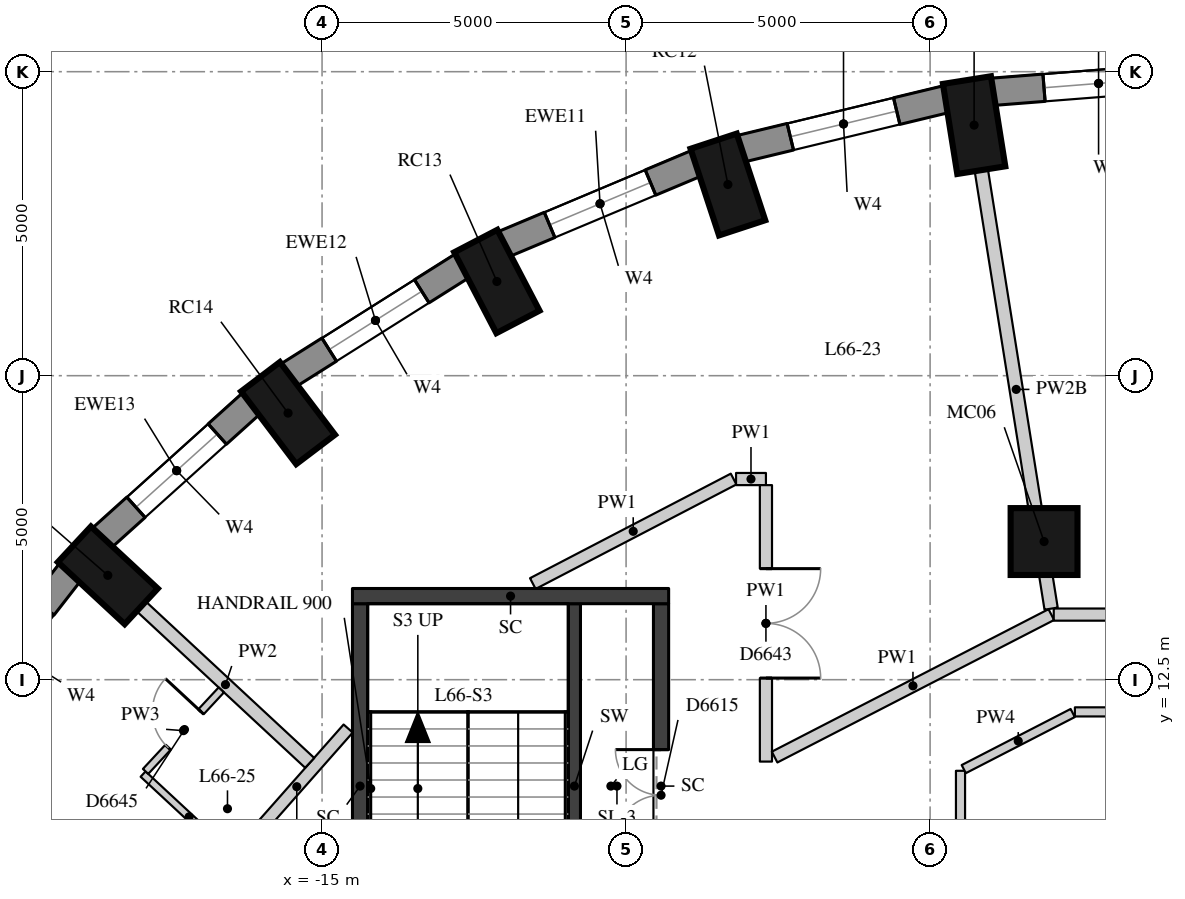
"""IFC4 building model, lengths in metres.
Left out: names, types, materials, properties, quantities, classifications, styles, units other than length and angle.
Written with IfcOpenShell. Run it as: python <this file> out.ifc"""

import sys

from ifc_helpers import new_model, si_unit, direction, frame, frame_2d, origin, origin_2d, place, context, subcontext, project, spatial, rectangle, extrude, element, fill, save


model = new_model("IFC4")
c1 = context("Model", 3, precision=1e-05, world=origin(), true_north=direction((0.0, 1.0)))
c2 = subcontext(c1, "Body", "Model", "MODEL_VIEW")
j1 = project(units=[si_unit("LENGTHUNIT", "METRE"), si_unit("PLANEANGLEUNIT", "RADIAN")], contexts=[c1])
p1 = place(None, origin())
s1 = spatial("IfcSite", under=j1, at=p1, CompositionType="ELEMENT")
p2 = place(p1, origin())
s2 = spatial("IfcBuilding", under=s1, at=p2, CompositionType="ELEMENT")
p3 = place(p2, frame((0.0, 0.0, 233.3)))
s3 = spatial("IfcBuildingStorey", under=s2, at=p3, CompositionType="ELEMENT", Elevation=233.3)
for number, where, z_axis, x_axis in (
    (1, (-4.276, 21.621, 0.0), (0.0, 0.0, 1.0), (-0.157, 0.988, 0.0)),
    (2, (-8.326, 20.644, 0.0), (0.0, 0.0, 1.0), (-0.312, 0.95, 0.0)),
    (3, (-12.125, 19.05, 0.0), (0.0, 0.0, 1.0), (-0.462, 0.887, 0.0)),
    (4, (-15.559, 16.885, 0.0), (0.0, 0.0, 1.0), (-0.604, 0.797, 0.0)),
    (5, (-18.523, 14.216, 0.0), (0.0, 0.0, 1.0), (-0.733, 0.681, 0.0)),
):
    element("IfcColumn", number, at=place(p3, frame(where, z_axis=z_axis, x_axis=x_axis)), inside=s3, PredefinedType="COLUMN", context=c2, shape_type="SweptSolid", body=[
        extrude(rectangle(XDim=1.5, YDim=0.8, at=origin_2d()), origin(), (0.0, 0.0, 1.0), 3.3),
    ])
p4 = place(p3, frame((-3.126, 14.772, 0.0), z_axis=(0.0, 0.0, 1.0), x_axis=(1.0, 0.0, 0.0)))
e6 = element("IfcColumn", 6, at=p4, inside=s3, PredefinedType="COLUMN", context=c2, shape_type="SweptSolid", body=[
    extrude(rectangle(XDim=1.1, YDim=1.1, at=origin_2d()), origin(), (0.0, 0.0, 1.0), 3.3),
])
p5 = place(p3, frame((-0.48, 22.444, 0.0), z_axis=(0.0, 0.0, 1.0), x_axis=(-0.996910775835, -0.078542377245, 0.0)))
e7 = element("IfcWall", 7, at=p5, inside=s3, PredefinedType="SOLIDWALL", context=c2, shape_type="SweptSolid", body=[
    extrude(rectangle(XDim=3.509, YDim=0.45, at=frame_2d((1.755, 0.0))), origin(), (0.0, 0.0, 1.0), 3.02),
])
p6 = place(p5, frame((0.855, 0.0, 0.4)))
e8 = element("IfcOpeningElement", 8, at=p6, cuts=e7, PredefinedType="OPENING", context=c2, shape_type="SweptSolid", body=[
    extrude(rectangle(XDim=1.8, YDim=1.75, at=frame_2d((0.9, 0.875))), frame((0.0, 0.235, 0.0), z_axis=(0.0, -1.0, 0.0), x_axis=(1.0, 0.0, 0.0)), (0.0, 0.0, 1.0), 0.47),
])
p7 = place(p3, frame((-4.729, 22.05, 0.0), z_axis=(0.0, 0.0, 1.0), x_axis=(-0.972099278496, -0.23456980357, 0.0)))
e9 = element("IfcWall", 9, at=p7, inside=s3, PredefinedType="SOLIDWALL", context=c2, shape_type="SweptSolid", body=[
    extrude(rectangle(XDim=3.487, YDim=0.45, at=frame_2d((1.743, 0.0))), origin(), (0.0, 0.0, 1.0), 3.02),
])
p8 = place(p7, frame((0.843, 0.0, 0.4)))
e10 = element("IfcOpeningElement", 10, at=p8, cuts=e9, PredefinedType="OPENING", context=c2, shape_type="SweptSolid", body=[
    extrude(rectangle(XDim=1.8, YDim=1.75, at=frame_2d((0.9, 0.875))), frame((0.0, 0.235, 0.0), z_axis=(0.0, -1.0, 0.0), x_axis=(1.0, 0.0, 0.0)), (0.0, 0.0, 1.0), 0.47),
])
p9 = place(p3, frame((-8.841, 20.995, 0.0), z_axis=(0.0, 0.0, 1.0), x_axis=(-0.922024627475, -0.387131226239, 0.0)))
e11 = element("IfcWall", 11, at=p9, inside=s3, PredefinedType="SOLIDWALL", context=c2, shape_type="SweptSolid", body=[
    extrude(rectangle(XDim=3.443, YDim=0.45, at=frame_2d((1.722, 0.0))), origin(), (0.0, 0.0, 1.0), 3.02),
])
p10 = place(p9, frame((0.822, 0.0, 0.4)))
e12 = element("IfcOpeningElement", 12, at=p10, cuts=e11, PredefinedType="OPENING", context=c2, shape_type="SweptSolid", body=[
    extrude(rectangle(XDim=1.8, YDim=1.75, at=frame_2d((0.9, 0.875))), frame((0.0, 0.235, 0.0), z_axis=(0.0, -1.0, 0.0), x_axis=(1.0, 0.0, 0.0)), (0.0, 0.0, 1.0), 0.47),
])
p11 = place(p3, frame((-12.69, 19.311, 0.0), z_axis=(0.0, 0.0, 1.0), x_axis=(-0.845929139811, -0.53329531258, 0.0)))
e13 = element("IfcWall", 13, at=p11, inside=s3, PredefinedType="SOLIDWALL", context=c2, shape_type="SweptSolid", body=[
    extrude(rectangle(XDim=3.385, YDim=0.45, at=frame_2d((1.692, 0.0))), origin(), (0.0, 0.0, 1.0), 3.02),
])
p12 = place(p11, frame((0.792, 0.0, 0.4)))
e14 = element("IfcOpeningElement", 14, at=p12, cuts=e13, PredefinedType="OPENING", context=c2, shape_type="SweptSolid", body=[
    extrude(rectangle(XDim=1.8, YDim=1.75, at=frame_2d((0.9, 0.875))), frame((0.0, 0.235, 0.0), z_axis=(0.0, -1.0, 0.0), x_axis=(1.0, 0.0, 0.0)), (0.0, 0.0, 1.0), 0.47),
])
p13 = place(p3, frame((-16.159, 17.047, 0.0), z_axis=(0.0, 0.0, 1.0), x_axis=(-0.743166014219, -0.669107073128, 0.0)))
e15 = element("IfcWall", 15, at=p13, inside=s3, PredefinedType="SOLIDWALL", context=c2, shape_type="SweptSolid", body=[
    extrude(rectangle(XDim=3.316, YDim=0.45, at=frame_2d((1.658, 0.0))), origin(), (0.0, 0.0, 1.0), 3.02),
])
p14 = place(p13, frame((0.758, 0.0, 0.4)))
e16 = element("IfcOpeningElement", 16, at=p14, cuts=e15, PredefinedType="OPENING", context=c2, shape_type="SweptSolid", body=[
    extrude(rectangle(XDim=1.8, YDim=1.75, at=frame_2d((0.9, 0.875))), frame((0.0, 0.235, 0.0), z_axis=(0.0, -1.0, 0.0), x_axis=(1.0, 0.0, 0.0)), (0.0, 0.0, 1.0), 0.47),
])
p15 = place(p3, frame((-19.142, 14.272, 0.0), z_axis=(0.0, 0.0, 1.0), x_axis=(-0.613862536705, -0.789412937587, 0.0)))
e17 = element("IfcWall", 17, at=p15, inside=s3, PredefinedType="SOLIDWALL", context=c2, shape_type="SweptSolid", body=[
    extrude(rectangle(XDim=3.247, YDim=0.45, at=frame_2d((1.624, 0.0))), origin(), (0.0, 0.0, 1.0), 3.02),
])
p16 = place(p15, frame((0.724, 0.0, 0.4)))
e18 = element("IfcOpeningElement", 18, at=p16, cuts=e17, PredefinedType="OPENING", context=c2, shape_type="SweptSolid", body=[
    extrude(rectangle(XDim=1.8, YDim=1.75, at=frame_2d((0.9, 0.875))), frame((0.0, 0.235, 0.0), z_axis=(0.0, -1.0, 0.0), x_axis=(1.0, 0.0, 0.0)), (0.0, 0.0, 1.0), 0.47),
])
p17 = place(p3, frame((-10.85, 7.75, 0.0), z_axis=(0.0, 0.0, 1.0), x_axis=(0.0, 1.0, 0.0)))
e19 = element("IfcWall", 19, at=p17, inside=s3, PredefinedType="SHEAR", context=c2, shape_type="SweptSolid", body=[
    extrude(rectangle(XDim=6.0, YDim=0.2, at=frame_2d((3.0, 0.0))), origin(), (0.0, 0.0, 1.0), 3.02),
])
p18 = place(p17, frame((0.1, 0.0, 0.0)))
e20 = element("IfcOpeningElement", 20, at=p18, cuts=e19, PredefinedType="OPENING", context=c2, shape_type="SweptSolid", body=[
    extrude(rectangle(XDim=1.5, YDim=2.1, at=frame_2d((0.75, 1.05))), frame((0.0, 0.11, 0.0), z_axis=(0.0, -1.0, 0.0), x_axis=(1.0, 0.0, 0.0)), (0.0, 0.0, 1.0), 0.22),
])
p19 = place(p3, frame((-14.375, 7.75, -0.28), z_axis=(0.0, 0.0, 1.0), x_axis=(0.0, 1.0, 0.0)))
e21 = element("IfcWall", 21, at=p19, inside=s3, PredefinedType="SHEAR", context=c2, shape_type="SweptSolid", body=[
    extrude(rectangle(XDim=6.0, YDim=0.25, at=frame_2d((3.0, 0.0))), origin(), (0.0, 0.0, 1.0), 3.3),
])
p20 = place(p3, frame((-9.425, 7.75, -0.28), z_axis=(0.0, 0.0, 1.0), x_axis=(0.0, 1.0, 0.0)))
e22 = element("IfcWall", 22, at=p20, inside=s3, PredefinedType="SHEAR", context=c2, shape_type="SweptSolid", body=[
    extrude(rectangle(XDim=6.0, YDim=0.25, at=frame_2d((3.0, 0.0))), origin(), (0.0, 0.0, 1.0), 3.3),
])
p21 = place(p20, frame((2.1, 0.0, 0.28)))
e23 = element("IfcOpeningElement", 23, at=p21, cuts=e22, PredefinedType="OPENING", context=c2, shape_type="SweptSolid", body=[
    extrude(rectangle(XDim=1.5, YDim=2.1, at=frame_2d((0.75, 1.05))), frame((0.0, 0.135, 0.0), z_axis=(0.0, -1.0, 0.0), x_axis=(1.0, 0.0, 0.0)), (0.0, 0.0, 1.0), 0.27),
])
p22 = place(p3, frame((-14.5, 13.875, -0.28), z_axis=(0.0, 0.0, 1.0), x_axis=(1.0, 0.0, 0.0)))
e24 = element("IfcWall", 24, at=p22, inside=s3, PredefinedType="SHEAR", context=c2, shape_type="SweptSolid", body=[
    extrude(rectangle(XDim=5.2, YDim=0.25, at=frame_2d((2.6, 0.0))), origin(), (0.0, 0.0, 1.0), 3.3),
])
p23 = place(p3, frame((-11.534, 14.081, 0.0), z_axis=(0.0, 0.0, 1.0), x_axis=(0.886975089277, 0.461817270143, 0.0)))
e25 = element("IfcWall", 25, at=p23, inside=s3, PredefinedType="PARTITIONING", context=c2, shape_type="SweptSolid", body=[
    extrude(rectangle(XDim=3.723, YDim=0.2, at=frame_2d((1.861, 0.0))), origin(), (0.0, 0.0, 1.0), 3.02),
])
p24 = place(p3, frame((-8.192, 15.8, 0.0), z_axis=(0.0, 0.0, 1.0), x_axis=(1.0, 0.0, 0.0)))
e26 = element("IfcWall", 26, at=p24, inside=s3, PredefinedType="PARTITIONING", context=c2, shape_type="SweptSolid", body=[
    extrude(rectangle(XDim=0.492, YDim=0.2, at=frame_2d((0.246, 0.0))), origin(), (0.0, 0.0, 1.0), 3.02),
])
p25 = place(p3, frame((-7.7, 15.7, 0.0), z_axis=(0.0, 0.0, 1.0), x_axis=(0.0, -1.0, 0.0)))
e27 = element("IfcWall", 27, at=p25, inside=s3, PredefinedType="PARTITIONING", context=c2, shape_type="SweptSolid", body=[
    extrude(rectangle(XDim=4.547, YDim=0.2, at=frame_2d((2.273, 0.0))), origin(), (0.0, 0.0, 1.0), 3.02),
])
p26 = place(p25, frame((1.374, 0.0, 0.0)))
e28 = element("IfcOpeningElement", 28, at=p26, cuts=e27, PredefinedType="OPENING", context=c2, shape_type="SweptSolid", body=[
    extrude(rectangle(XDim=1.8, YDim=2.1, at=frame_2d((0.9, 1.05))), frame((0.0, 0.11, 0.0), z_axis=(0.0, -1.0, 0.0), x_axis=(1.0, 0.0, 0.0)), (0.0, 0.0, 1.0), 0.22),
])
p27 = place(p3, frame((-7.557, 11.227, 0.0), z_axis=(0.0, 0.0, 1.0), x_axis=(0.889060449642, 0.457789817364, 0.0)))
e29 = element("IfcWall", 29, at=p27, inside=s3, PredefinedType="PARTITIONING", context=c2, shape_type="SweptSolid", body=[
    extrude(rectangle(XDim=5.119, YDim=0.2, at=frame_2d((2.559, 0.0))), origin(), (0.0, 0.0, 1.0), 3.02),
])
p28 = place(p3, frame((-2.967, 13.571, 0.0), z_axis=(0.0, 0.0, 1.0), x_axis=(1.0, 0.0, 0.0)))
e30 = element("IfcWall", 30, at=p28, inside=s3, PredefinedType="PARTITIONING", context=c2, shape_type="SweptSolid", body=[
    extrude(rectangle(XDim=5.773, YDim=0.2, at=frame_2d((2.887, 0.0))), origin(), (0.0, 0.0, 1.0), 3.02),
])
p29 = place(p28, frame((2.441, 0.0, 0.0)))
e31 = element("IfcOpeningElement", 31, at=p29, cuts=e30, PredefinedType="OPENING", context=c2, shape_type="SweptSolid", body=[
    extrude(rectangle(XDim=1.1, YDim=2.1, at=frame_2d((0.55, 1.05))), frame((0.0, 0.11, 0.0), z_axis=(0.0, -1.0, 0.0), x_axis=(1.0, 0.0, 0.0)), (0.0, 0.0, 1.0), 0.22),
])
p30 = place(p3, frame((-16.26, 9.783, 0.0), z_axis=(0.0, 0.0, 1.0), x_axis=(0.66199168739, 0.74951117792, 0.0)))
e32 = element("IfcWall", 32, at=p30, inside=s3, PredefinedType="PARTITIONING", context=c2, shape_type="SweptSolid", body=[
    extrude(rectangle(XDim=2.552, YDim=0.2, at=frame_2d((1.276, 0.0))), origin(), (0.0, 0.0, 1.0), 3.02),
])
p31 = place(p3, frame((-2.619, 11.97, 0.0), z_axis=(0.0, 0.0, 1.0), x_axis=(1.0, 0.0, 0.0)))
e33 = element("IfcWall", 33, at=p31, inside=s3, PredefinedType="PARTITIONING", context=c2, shape_type="SweptSolid", body=[
    extrude(rectangle(XDim=4.019, YDim=0.15, at=frame_2d((2.009, 0.0))), origin(), (0.0, 0.0, 1.0), 3.02),
])
p32 = place(p31, frame((1.559, 0.0, 0.0)))
e34 = element("IfcOpeningElement", 34, at=p32, cuts=e33, PredefinedType="OPENING", context=c2, shape_type="SweptSolid", body=[
    extrude(rectangle(XDim=0.9, YDim=2.1, at=frame_2d((0.45, 1.05))), frame((0.0, 0.085, 0.0), z_axis=(0.0, -1.0, 0.0), x_axis=(1.0, 0.0, 0.0)), (0.0, 0.0, 1.0), 0.17),
])
p33 = place(p3, frame((-4.5, 8.356, 0.0), z_axis=(0.0, 0.0, 1.0), x_axis=(0.0, 1.0, 0.0)))
e35 = element("IfcWall", 35, at=p33, inside=s3, PredefinedType="PARTITIONING", context=c2, shape_type="SweptSolid", body=[
    extrude(rectangle(XDim=2.645, YDim=0.15, at=frame_2d((1.323, 0.0))), origin(), (0.0, 0.0, 1.0), 3.02),
])
p34 = place(p3, frame((-4.447, 11.029, 0.0), z_axis=(0.0, 0.0, 1.0), x_axis=(0.88908361723, 0.457744821459, 0.0)))
e36 = element("IfcWall", 36, at=p34, inside=s3, PredefinedType="PARTITIONING", context=c2, shape_type="SweptSolid", body=[
    extrude(rectangle(XDim=2.016, YDim=0.15, at=frame_2d((1.008, 0.0))), origin(), (0.0, 0.0, 1.0), 3.02),
])
p35 = place(p3, frame((-4.158, 20.88, 0.0), z_axis=(0.0, 0.0, 1.0), x_axis=(0.157260291638, -0.987557188559, 0.0)))
e37 = element("IfcWall", 37, at=p35, inside=s3, PredefinedType="PARTITIONING", context=c2, shape_type="SweptSolid", body=[
    extrude(rectangle(XDim=7.303, YDim=0.22, at=frame_2d((3.651, 0.0))), origin(), (0.0, 0.0, 1.0), 2.57),
])
p36 = place(p3, frame((-17.974, 13.706, 0.0), z_axis=(0.0, 0.0, 1.0), x_axis=(0.732644022802, -0.680612030346, 0.0)))
e38 = element("IfcWall", 38, at=p36, inside=s3, PredefinedType="PARTITIONING", context=c2, shape_type="SweptSolid", body=[
    extrude(rectangle(XDim=3.782, YDim=0.22, at=frame_2d((1.891, 0.0))), origin(), (0.0, 0.0, 1.0), 3.02),
])
p37 = place(p3, frame((-16.429, 9.541, 0.0), z_axis=(0.0, 0.0, 1.0), x_axis=(-0.732625124054, 0.680632373315, 0.0)))
e39 = element("IfcWall", 39, at=p37, inside=s3, PredefinedType="PARTITIONING", context=c2, shape_type="SweptSolid", body=[
    extrude(rectangle(XDim=2.066, YDim=0.12, at=frame_2d((1.033, 0.0))), origin(), (0.0, 0.0, 1.0), 3.02),
])
p38 = place(p3, frame((-17.902, 10.991, 0.0), z_axis=(0.0, 0.0, 1.0), x_axis=(0.680681343043, 0.732579626548, 0.0)))
e40 = element("IfcWall", 40, at=p38, inside=s3, PredefinedType="PARTITIONING", context=c2, shape_type="SweptSolid", body=[
    extrude(rectangle(XDim=1.83, YDim=0.12, at=frame_2d((0.915, 0.0))), origin(), (0.0, 0.0, 1.0), 3.02),
])
p39 = place(p38, frame((0.54, 0.0, 0.0)))
e41 = element("IfcOpeningElement", 41, at=p39, cuts=e40, PredefinedType="OPENING", context=c2, shape_type="SweptSolid", body=[
    extrude(rectangle(XDim=0.8, YDim=2.1, at=frame_2d((0.4, 1.05))), frame((0.0, 0.07, 0.0), z_axis=(0.0, -1.0, 0.0), x_axis=(1.0, 0.0, 0.0)), (0.0, 0.0, 1.0), 0.14),
])
p40 = place(p6, origin())
e42 = element("IfcWindow", 42, at=p40, inside=s3, PartitioningType="SINGLE_PANEL", PredefinedType="WINDOW", context=c2, shape_type="SweptSolid", body=[
    extrude(rectangle(XDim=1.8, YDim=1.75, at=frame_2d((0.9, 0.875))), frame((0.0, 0.035, 0.0), z_axis=(0.0, -1.0, 0.0), x_axis=(1.0, 0.0, 0.0)), (0.0, 0.0, 1.0), 0.06),
])
fill(e8, e42)
p41 = place(p8, origin())
e43 = element("IfcWindow", 43, at=p41, inside=s3, PartitioningType="SINGLE_PANEL", PredefinedType="WINDOW", context=c2, shape_type="SweptSolid", body=[
    extrude(rectangle(XDim=1.8, YDim=1.75, at=frame_2d((0.9, 0.875))), frame((0.0, 0.035, 0.0), z_axis=(0.0, -1.0, 0.0), x_axis=(1.0, 0.0, 0.0)), (0.0, 0.0, 1.0), 0.06),
])
fill(e10, e43)
p42 = place(p10, origin())
e44 = element("IfcWindow", 44, at=p42, inside=s3, PartitioningType="SINGLE_PANEL", PredefinedType="WINDOW", context=c2, shape_type="SweptSolid", body=[
    extrude(rectangle(XDim=1.8, YDim=1.75, at=frame_2d((0.9, 0.875))), frame((0.0, 0.035, 0.0), z_axis=(0.0, -1.0, 0.0), x_axis=(1.0, 0.0, 0.0)), (0.0, 0.0, 1.0), 0.06),
])
fill(e12, e44)
p43 = place(p12, origin())
e45 = element("IfcWindow", 45, at=p43, inside=s3, PartitioningType="SINGLE_PANEL", PredefinedType="WINDOW", context=c2, shape_type="SweptSolid", body=[
    extrude(rectangle(XDim=1.8, YDim=1.75, at=frame_2d((0.9, 0.875))), frame((0.0, 0.035, 0.0), z_axis=(0.0, -1.0, 0.0), x_axis=(1.0, 0.0, 0.0)), (0.0, 0.0, 1.0), 0.06),
])
fill(e14, e45)
p44 = place(p14, origin())
e46 = element("IfcWindow", 46, at=p44, inside=s3, PartitioningType="SINGLE_PANEL", PredefinedType="WINDOW", context=c2, shape_type="SweptSolid", body=[
    extrude(rectangle(XDim=1.8, YDim=1.75, at=frame_2d((0.9, 0.875))), frame((0.0, 0.035, 0.0), z_axis=(0.0, -1.0, 0.0), x_axis=(1.0, 0.0, 0.0)), (0.0, 0.0, 1.0), 0.06),
])
fill(e16, e46)
p45 = place(p21, origin())
e47 = element("IfcDoor", 47, at=p45, inside=s3, OperationType="DOUBLE_DOOR_SINGLE_SWING", PredefinedType="DOOR", context=c2, shape_type="SweptSolid", body=[
    extrude(rectangle(XDim=1.5, YDim=2.1, at=frame_2d((0.75, 1.05))), frame((0.0, 0.025, 0.0), z_axis=(0.0, -1.0, 0.0), x_axis=(1.0, 0.0, 0.0)), (0.0, 0.0, 1.0), 0.05),
])
fill(e23, e47)
p46 = place(p26, origin())
e48 = element("IfcDoor", 48, at=p46, inside=s3, OperationType="DOUBLE_DOOR_SINGLE_SWING", PredefinedType="DOOR", context=c2, shape_type="SweptSolid", body=[
    extrude(rectangle(XDim=1.8, YDim=2.1, at=frame_2d((0.9, 1.05))), frame((0.0, 0.025, 0.0), z_axis=(0.0, -1.0, 0.0), x_axis=(1.0, 0.0, 0.0)), (0.0, 0.0, 1.0), 0.05),
])
fill(e28, e48)
p47 = place(p39, origin())
e49 = element("IfcDoor", 49, at=p47, inside=s3, OperationType="SINGLE_SWING_RIGHT", PredefinedType="DOOR", context=c2, shape_type="SweptSolid", body=[
    extrude(rectangle(XDim=0.8, YDim=2.1, at=frame_2d((0.4, 1.05))), frame((0.0, 0.025, 0.0), z_axis=(0.0, -1.0, 0.0), x_axis=(1.0, 0.0, 0.0)), (0.0, 0.0, 1.0), 0.05),
])
fill(e41, e49)
save(model, sys.argv[1])
